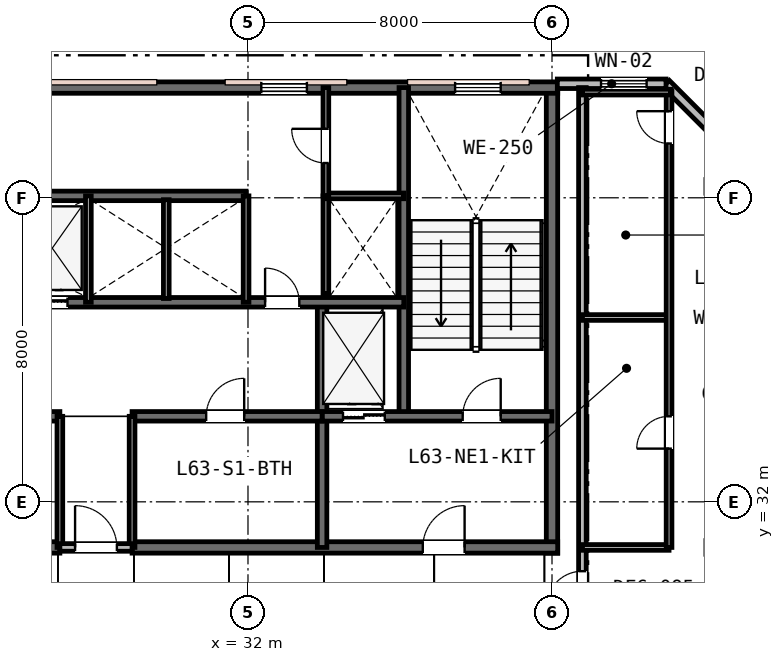
"""IFC4 building model, lengths in metres.
Left out: names, types, materials, properties, quantities, classifications, styles, units other than length and angle.
Written with IfcOpenShell. Run it as: python <this file> out.ifc"""

import sys

from ifc_helpers import new_model, si_unit, direction, frame, frame_2d, origin, place, context, subcontext, project, spatial, rectangle, extrude, element, fill, save


model = new_model("IFC4")
c1 = context("Model", 3, precision=1e-05, world=origin(), true_north=direction((0.0, 1.0)))
c2 = subcontext(c1, "Body", "Model", "MODEL_VIEW")
j1 = project(units=[si_unit("LENGTHUNIT", "METRE"), si_unit("PLANEANGLEUNIT", "RADIAN")], contexts=[c1])
p1 = place(None, origin())
s1 = spatial("IfcSite", under=j1, at=p1, CompositionType="ELEMENT")
p2 = place(p1, origin())
s2 = spatial("IfcBuilding", under=s1, at=p2, CompositionType="ELEMENT")
p3 = place(p2, frame((0.0, 0.0, 245.0)))
s3 = spatial("IfcBuildingStorey", under=s2, at=p3, CompositionType="ELEMENT", Elevation=245.0)
p4 = place(p3, frame((40.0, 30.65, 0.0), z_axis=(0.0, 0.0, 1.0), x_axis=(0.0, 1.0, 0.0)))
e1 = element("IfcWall", 1, at=p4, inside=s3, PredefinedType="SHEAR", context=c2, shape_type="SweptSolid", body=[
    extrude(rectangle(XDim=12.3, YDim=0.3, at=frame_2d((6.15, 0.0))), origin(), (0.0, 0.0, 1.0), 3.8),
])
p5 = place(p3, frame((15.85, 42.9, 0.0), z_axis=(0.0, 0.0, 1.0), x_axis=(1.0, 0.0, 0.0)))
e2 = element("IfcWall", 2, at=p5, inside=s3, PredefinedType="SHEAR", context=c2, shape_type="SweptSolid", body=[
    extrude(rectangle(XDim=24.3, YDim=0.3, at=frame_2d((12.15, 0.0))), origin(), (0.0, 0.0, 1.0), 3.8),
])
p6 = place(p5, frame((1.6, 0.0, 0.95)))
e3 = element("IfcOpeningElement", 3, at=p6, cuts=e2, PredefinedType="OPENING", context=c2, shape_type="SweptSolid", body=[
    extrude(rectangle(XDim=1.2, YDim=1.6, at=frame_2d((0.6, 0.8))), frame((0.0, 0.16, 0.0), z_axis=(0.0, -1.0, 0.0), x_axis=(1.0, 0.0, 0.0)), (0.0, 0.0, 1.0), 0.32),
])
p7 = place(p5, frame((16.5, 0.0, 0.95)))
e4 = element("IfcOpeningElement", 4, at=p7, cuts=e2, PredefinedType="OPENING", context=c2, shape_type="SweptSolid", body=[
    extrude(rectangle(XDim=1.2, YDim=1.6, at=frame_2d((0.6, 0.8))), frame((0.0, 0.16, 0.0), z_axis=(0.0, -1.0, 0.0), x_axis=(1.0, 0.0, 0.0)), (0.0, 0.0, 1.0), 0.32),
])
p8 = place(p5, frame((21.6, 0.0, 0.95)))
e5 = element("IfcOpeningElement", 5, at=p8, cuts=e2, PredefinedType="OPENING", context=c2, shape_type="SweptSolid", body=[
    extrude(rectangle(XDim=1.2, YDim=1.6, at=frame_2d((0.6, 0.8))), frame((0.0, 0.16, 0.0), z_axis=(0.0, -1.0, 0.0), x_axis=(1.0, 0.0, 0.0)), (0.0, 0.0, 1.0), 0.32),
])
p9 = place(p3, frame((15.85, 30.8, 0.0), z_axis=(0.0, 0.0, 1.0), x_axis=(1.0, 0.0, 0.0)))
e6 = element("IfcWall", 6, at=p9, inside=s3, PredefinedType="SHEAR", context=c2, shape_type="SweptSolid", body=[
    extrude(rectangle(XDim=11.2, YDim=0.3, at=frame_2d((5.6, 0.0))), origin(), (0.0, 0.0, 1.0), 3.8),
])
p10 = place(p9, frame((2.45, 0.0, 0.0)))
e7 = element("IfcOpeningElement", 7, at=p10, cuts=e6, PredefinedType="OPENING", context=c2, shape_type="SweptSolid", body=[
    extrude(rectangle(XDim=1.1, YDim=2.15, at=frame_2d((0.55, 1.075))), frame((0.0, 0.16, 0.0), z_axis=(0.0, -1.0, 0.0), x_axis=(1.0, 0.0, 0.0)), (0.0, 0.0, 1.0), 0.32),
])
p11 = place(p3, frame((28.95, 30.8, 0.0), z_axis=(0.0, 0.0, 1.0), x_axis=(1.0, 0.0, 0.0)))
e8 = element("IfcWall", 8, at=p11, inside=s3, PredefinedType="SHEAR", context=c2, shape_type="SweptSolid", body=[
    extrude(rectangle(XDim=11.2, YDim=0.3, at=frame_2d((5.6, 0.0))), origin(), (0.0, 0.0, 1.0), 3.8),
])
p12 = place(p11, frame((7.65, 0.0, 0.0)))
e9 = element("IfcOpeningElement", 9, at=p12, cuts=e8, PredefinedType="OPENING", context=c2, shape_type="SweptSolid", body=[
    extrude(rectangle(XDim=1.1, YDim=2.15, at=frame_2d((0.55, 1.075))), frame((0.0, 0.16, 0.0), z_axis=(0.0, -1.0, 0.0), x_axis=(1.0, 0.0, 0.0)), (0.0, 0.0, 1.0), 0.32),
])
p13 = place(p3, frame((36.1, 34.25, 0.0), z_axis=(0.0, 0.0, 1.0), x_axis=(0.0, 1.0, 0.0)))
e10 = element("IfcWall", 10, at=p13, inside=s3, PredefinedType="SHEAR", context=c2, shape_type="SweptSolid", body=[
    extrude(rectangle(XDim=8.65, YDim=0.25, at=frame_2d((4.325, 0.0))), origin(), (0.0, 0.0, 1.0), 3.8),
])
p14 = place(p3, frame((33.95, 30.8, 0.0), z_axis=(0.0, 0.0, 1.0), x_axis=(0.0, 1.0, 0.0)))
e11 = element("IfcWall", 11, at=p14, inside=s3, PredefinedType="SHEAR", context=c2, shape_type="SweptSolid", body=[
    extrude(rectangle(XDim=6.45, YDim=0.25, at=frame_2d((3.225, 0.0))), origin(), (0.0, 0.0, 1.0), 3.8),
])
p15 = place(p3, frame((33.95, 34.25, 0.0), z_axis=(0.0, 0.0, 1.0), x_axis=(1.0, 0.0, 0.0)))
e12 = element("IfcWall", 12, at=p15, inside=s3, PredefinedType="SHEAR", context=c2, shape_type="SweptSolid", body=[
    extrude(rectangle(XDim=6.05, YDim=0.25, at=frame_2d((3.025, 0.0))), origin(), (0.0, 0.0, 1.0), 3.8),
])
p16 = place(p15, frame((3.7, 0.0, 0.0)))
e13 = element("IfcOpeningElement", 13, at=p16, cuts=e12, PredefinedType="OPENING", context=c2, shape_type="SweptSolid", body=[
    extrude(rectangle(XDim=1.0, YDim=2.15, at=frame_2d((0.5, 1.075))), frame((0.0, 0.135, 0.0), z_axis=(0.0, -1.0, 0.0), x_axis=(1.0, 0.0, 0.0)), (0.0, 0.0, 1.0), 0.27),
])
p17 = place(p15, frame((0.55, 0.0, 0.0)))
e14 = element("IfcOpeningElement", 14, at=p17, cuts=e12, PredefinedType="OPENING", context=c2, shape_type="SweptSolid", body=[
    extrude(rectangle(XDim=1.1, YDim=2.15, at=frame_2d((0.55, 1.075))), frame((0.0, 0.135, 0.0), z_axis=(0.0, -1.0, 0.0), x_axis=(1.0, 0.0, 0.0)), (0.0, 0.0, 1.0), 0.27),
])
p18 = place(p3, frame((22.05, 34.25, 0.0), z_axis=(0.0, 0.0, 1.0), x_axis=(1.0, 0.0, 0.0)))
e15 = element("IfcWall", 15, at=p18, inside=s3, PredefinedType="SHEAR", context=c2, shape_type="SweptSolid", body=[
    extrude(rectangle(XDim=5.0, YDim=0.25, at=frame_2d((2.5, 0.0))), origin(), (0.0, 0.0, 1.0), 3.8),
])
p19 = place(p18, frame((1.95, 0.0, 0.0)))
e16 = element("IfcOpeningElement", 16, at=p19, cuts=e15, PredefinedType="OPENING", context=c2, shape_type="SweptSolid", body=[
    extrude(rectangle(XDim=1.0, YDim=2.15, at=frame_2d((0.5, 1.075))), frame((0.0, 0.135, 0.0), z_axis=(0.0, -1.0, 0.0), x_axis=(1.0, 0.0, 0.0)), (0.0, 0.0, 1.0), 0.27),
])
p20 = place(p3, frame((28.95, 34.25, 0.0), z_axis=(0.0, 0.0, 1.0), x_axis=(1.0, 0.0, 0.0)))
e17 = element("IfcWall", 17, at=p20, inside=s3, PredefinedType="SHEAR", context=c2, shape_type="SweptSolid", body=[
    extrude(rectangle(XDim=5.0, YDim=0.25, at=frame_2d((2.5, 0.0))), origin(), (0.0, 0.0, 1.0), 3.8),
])
p21 = place(p20, frame((1.95, 0.0, 0.0)))
e18 = element("IfcOpeningElement", 18, at=p21, cuts=e17, PredefinedType="OPENING", context=c2, shape_type="SweptSolid", body=[
    extrude(rectangle(XDim=1.0, YDim=2.15, at=frame_2d((0.5, 1.075))), frame((0.0, 0.135, 0.0), z_axis=(0.0, -1.0, 0.0), x_axis=(1.0, 0.0, 0.0)), (0.0, 0.0, 1.0), 0.27),
])
p22 = place(p3, frame((19.9, 37.25, 0.0), z_axis=(0.0, 0.0, 1.0), x_axis=(1.0, 0.0, 0.0)))
e19 = element("IfcWall", 19, at=p22, inside=s3, PredefinedType="SHEAR", context=c2, shape_type="SweptSolid", body=[
    extrude(rectangle(XDim=16.2, YDim=0.25, at=frame_2d((8.1, 0.0))), origin(), (0.0, 0.0, 1.0), 3.8),
])
p23 = place(p22, frame((12.55, 0.0, 0.0)))
e20 = element("IfcOpeningElement", 20, at=p23, cuts=e19, PredefinedType="OPENING", context=c2, shape_type="SweptSolid", body=[
    extrude(rectangle(XDim=0.9, YDim=2.15, at=frame_2d((0.45, 1.075))), frame((0.0, 0.135, 0.0), z_axis=(0.0, -1.0, 0.0), x_axis=(1.0, 0.0, 0.0)), (0.0, 0.0, 1.0), 0.27),
])
p24 = place(p22, frame((2.5, 0.0, 0.0)))
e21 = element("IfcOpeningElement", 21, at=p24, cuts=e19, PredefinedType="OPENING", context=c2, shape_type="SweptSolid", body=[
    extrude(rectangle(XDim=1.05, YDim=2.15, at=frame_2d((0.525, 1.075))), frame((0.0, 0.135, 0.0), z_axis=(0.0, -1.0, 0.0), x_axis=(1.0, 0.0, 0.0)), (0.0, 0.0, 1.0), 0.27),
])
p25 = place(p22, frame((4.4, 0.0, 0.0)))
e22 = element("IfcOpeningElement", 22, at=p25, cuts=e19, PredefinedType="OPENING", context=c2, shape_type="SweptSolid", body=[
    extrude(rectangle(XDim=1.05, YDim=2.15, at=frame_2d((0.525, 1.075))), frame((0.0, 0.135, 0.0), z_axis=(0.0, -1.0, 0.0), x_axis=(1.0, 0.0, 0.0)), (0.0, 0.0, 1.0), 0.27),
])
p26 = place(p22, frame((6.3, 0.0, 0.0)))
e23 = element("IfcOpeningElement", 23, at=p26, cuts=e19, PredefinedType="OPENING", context=c2, shape_type="SweptSolid", body=[
    extrude(rectangle(XDim=1.05, YDim=2.15, at=frame_2d((0.525, 1.075))), frame((0.0, 0.135, 0.0), z_axis=(0.0, -1.0, 0.0), x_axis=(1.0, 0.0, 0.0)), (0.0, 0.0, 1.0), 0.27),
])
p27 = place(p3, frame((19.9, 40.05, 0.0), z_axis=(0.0, 0.0, 1.0), x_axis=(1.0, 0.0, 0.0)))
e24 = element("IfcWall", 24, at=p27, inside=s3, PredefinedType="SHEAR", context=c2, shape_type="SweptSolid", body=[
    extrude(rectangle(XDim=12.05, YDim=0.25, at=frame_2d((6.025, 0.0))), origin(), (0.0, 0.0, 1.0), 3.8),
])
p28 = place(p3, frame((46.0, 40.0, 0.0), z_axis=(0.0, 0.0, 1.0), x_axis=(-0.707106781187, 0.707106781187, 0.0)))
e25 = element("IfcWall", 25, at=p28, inside=s3, PredefinedType="STANDARD", context=c2, shape_type="SweptSolid", body=[
    extrude(rectangle(XDim=4.243, YDim=0.25, at=frame_2d((2.121, 0.0))), origin(), (0.0, 0.0, 1.0), 3.53),
])
p29 = place(p28, frame((1.411, 0.0, 0.85)))
e26 = element("IfcOpeningElement", 26, at=p29, cuts=e25, PredefinedType="OPENING", context=c2, shape_type="SweptSolid", body=[
    extrude(rectangle(XDim=1.2, YDim=1.6, at=frame_2d((0.6, 0.8))), frame((0.0, 0.135, 0.0), z_axis=(0.0, -1.0, 0.0), x_axis=(1.0, 0.0, 0.0)), (0.0, 0.0, 1.0), 0.27),
])
p30 = place(p3, frame((43.0, 43.0, 0.0), z_axis=(0.0, 0.0, 1.0), x_axis=(-1.0, 0.0, 0.0)))
e27 = element("IfcWall", 27, at=p30, inside=s3, PredefinedType="STANDARD", context=c2, shape_type="SweptSolid", body=[
    extrude(rectangle(XDim=2.86, YDim=0.25, at=frame_2d((1.43, 0.0))), origin(), (0.0, 0.0, 1.0), 3.53),
])
p31 = place(p30, frame((0.51, 0.0, 0.85)))
e28 = element("IfcOpeningElement", 28, at=p31, cuts=e27, PredefinedType="OPENING", context=c2, shape_type="SweptSolid", body=[
    extrude(rectangle(XDim=1.2, YDim=1.6, at=frame_2d((0.6, 0.8))), frame((0.0, 0.135, 0.0), z_axis=(0.0, -1.0, 0.0), x_axis=(1.0, 0.0, 0.0)), (0.0, 0.0, 1.0), 0.27),
])
for number, where, z_axis, x_axis in (
    (29, (27.05, 30.8, 0.0), (0.0, 0.0, 1.0), (0.0, 1.0, 0.0)),
    (30, (28.95, 30.8, 0.0), (0.0, 0.0, 1.0), (0.0, 1.0, 0.0)),
):
    element("IfcWall", number, at=place(p3, frame(where, z_axis=z_axis, x_axis=x_axis)), inside=s3, PredefinedType="PLUMBINGWALL", context=c2, shape_type="SweptSolid", body=[
        extrude(rectangle(XDim=3.45, YDim=0.15, at=frame_2d((1.725, 0.0))), origin(), (0.0, 0.0, 1.0), 3.28),
    ])
p32 = place(p3, frame((27.05, 30.8, 0.0), z_axis=(0.0, 0.0, 1.0), x_axis=(1.0, 0.0, 0.0)))
e31 = element("IfcWall", 31, at=p32, inside=s3, PredefinedType="PARTITIONING", context=c2, shape_type="SweptSolid", body=[
    extrude(rectangle(XDim=1.9, YDim=0.2, at=frame_2d((0.95, 0.0))), origin(), (0.0, 0.0, 1.0), 3.28),
])
p33 = place(p32, frame((0.4, 0.0, 0.0)))
e32 = element("IfcOpeningElement", 32, at=p33, cuts=e31, PredefinedType="OPENING", context=c2, shape_type="SweptSolid", body=[
    extrude(rectangle(XDim=1.1, YDim=2.15, at=frame_2d((0.55, 1.075))), frame((0.0, 0.11, 0.0), z_axis=(0.0, -1.0, 0.0), x_axis=(1.0, 0.0, 0.0)), (0.0, 0.0, 1.0), 0.22),
])
for number, where, z_axis, x_axis in (
    (33, (27.8, 37.25, 0.0), (0.0, 0.0, 1.0), (0.0, 1.0, 0.0)),
    (34, (31.95, 37.25, 0.0), (0.0, 0.0, 1.0), (0.0, 1.0, 0.0)),
):
    element("IfcWall", number, at=place(p3, frame(where, z_axis=z_axis, x_axis=x_axis)), inside=s3, PredefinedType="PLUMBINGWALL", context=c2, shape_type="SweptSolid", body=[
        extrude(rectangle(XDim=2.8, YDim=0.15, at=frame_2d((1.4, 0.0))), origin(), (0.0, 0.0, 1.0), 3.53),
    ])
p34 = place(p3, frame((29.85, 37.35, 0.0), z_axis=(0.0, 0.0, 1.0), x_axis=(0.0, 1.0, 0.0)))
e35 = element("IfcWall", 35, at=p34, inside=s3, PredefinedType="PLUMBINGWALL", context=c2, shape_type="SweptSolid", body=[
    extrude(rectangle(XDim=2.6, YDim=0.15, at=frame_2d((1.3, 0.0))), origin(), (0.0, 0.0, 1.0), 3.53),
])
p35 = place(p3, frame((34.05, 37.473, 0.0), z_axis=(0.0, 0.0, 1.0), x_axis=(0.0, 1.0, 0.0)))
e36 = element("IfcWall", 36, at=p35, inside=s3, PredefinedType="PLUMBINGWALL", context=c2, shape_type="SweptSolid", body=[
    extrude(rectangle(XDim=2.577, YDim=0.15, at=frame_2d((1.288, 0.0))), origin(), (0.0, 0.0, 1.0), 3.53),
])
p36 = place(p3, frame((34.05, 40.05, 0.0), z_axis=(0.0, 0.0, 1.0), x_axis=(1.0, 0.0, 0.0)))
e37 = element("IfcWall", 37, at=p36, inside=s3, PredefinedType="PARTITIONING", context=c2, shape_type="SweptSolid", body=[
    extrude(rectangle(XDim=2.05, YDim=0.15, at=frame_2d((1.025, 0.0))), origin(), (0.0, 0.0, 1.0), 3.53),
])
p37 = place(p3, frame((34.05, 40.05, 0.0), z_axis=(0.0, 0.0, 1.0), x_axis=(0.0, 1.0, 0.0)))
e38 = element("IfcWall", 38, at=p37, inside=s3, PredefinedType="PARTITIONING", context=c2, shape_type="SweptSolid", body=[
    extrude(rectangle(XDim=2.85, YDim=0.15, at=frame_2d((1.425, 0.0))), origin(), (0.0, 0.0, 1.0), 3.53),
])
p38 = place(p37, frame((0.865, 0.0, 0.0)))
e39 = element("IfcOpeningElement", 39, at=p38, cuts=e38, PredefinedType="OPENING", context=c2, shape_type="SweptSolid", body=[
    extrude(rectangle(XDim=0.9, YDim=2.15, at=frame_2d((0.45, 1.075))), frame((0.0, 0.085, 0.0), z_axis=(0.0, -1.0, 0.0), x_axis=(1.0, 0.0, 0.0)), (0.0, 0.0, 1.0), 0.17),
])
p39 = place(p3, frame((40.8, 28.6, 0.0), z_axis=(0.0, 0.0, 1.0), x_axis=(0.0, 1.0, 0.0)))
e40 = element("IfcWall", 40, at=p39, inside=s3, PredefinedType="PARTITIONING", context=c2, shape_type="SweptSolid", body=[
    extrude(rectangle(XDim=14.3, YDim=0.2, at=frame_2d((7.15, 0.0))), origin(), (0.0, 0.0, 1.0), 3.16),
])
p40 = place(p39, frame((0.625, 0.0, 0.0)))
e41 = element("IfcOpeningElement", 41, at=p40, cuts=e40, PredefinedType="OPENING", context=c2, shape_type="SweptSolid", body=[
    extrude(rectangle(XDim=0.95, YDim=2.15, at=frame_2d((0.475, 1.075))), frame((0.0, 0.11, 0.0), z_axis=(0.0, -1.0, 0.0), x_axis=(1.0, 0.0, 0.0)), (0.0, 0.0, 1.0), 0.22),
])
p41 = place(p3, frame((40.8, 30.8, 0.0), z_axis=(0.0, 0.0, 1.0), x_axis=(1.0, 0.0, 0.0)))
e42 = element("IfcWall", 42, at=p41, inside=s3, PredefinedType="PARTITIONING", context=c2, shape_type="SweptSolid", body=[
    extrude(rectangle(XDim=2.28, YDim=0.15, at=frame_2d((1.14, 0.0))), origin(), (0.0, 0.0, 1.0), 3.16),
])
p42 = place(p3, frame((40.8, 36.85, 0.0), z_axis=(0.0, 0.0, 1.0), x_axis=(1.0, 0.0, 0.0)))
e43 = element("IfcWall", 43, at=p42, inside=s3, PredefinedType="PARTITIONING", context=c2, shape_type="SweptSolid", body=[
    extrude(rectangle(XDim=2.28, YDim=0.15, at=frame_2d((1.14, 0.0))), origin(), (0.0, 0.0, 1.0), 3.53),
])
p43 = place(p3, frame((43.08, 30.8, 0.0), z_axis=(0.0, 0.0, 1.0), x_axis=(0.0, 1.0, 0.0)))
e44 = element("IfcWall", 44, at=p43, inside=s3, PredefinedType="PARTITIONING", context=c2, shape_type="SweptSolid", body=[
    extrude(rectangle(XDim=12.02, YDim=0.15, at=frame_2d((6.01, 0.0))), origin(), (0.0, 0.0, 1.0), 3.16),
])
p44 = place(p43, frame((2.6, 0.0, 0.0)))
e45 = element("IfcOpeningElement", 45, at=p44, cuts=e44, PredefinedType="OPENING", context=c2, shape_type="SweptSolid", body=[
    extrude(rectangle(XDim=0.85, YDim=2.15, at=frame_2d((0.425, 1.075))), frame((0.0, 0.085, 0.0), z_axis=(0.0, -1.0, 0.0), x_axis=(1.0, 0.0, 0.0)), (0.0, 0.0, 1.0), 0.17),
])
p45 = place(p43, frame((10.629, 0.0, 0.0)))
e46 = element("IfcOpeningElement", 46, at=p45, cuts=e44, PredefinedType="OPENING", context=c2, shape_type="SweptSolid", body=[
    extrude(rectangle(XDim=0.85, YDim=2.15, at=frame_2d((0.425, 1.075))), frame((0.0, 0.085, 0.0), z_axis=(0.0, -1.0, 0.0), x_axis=(1.0, 0.0, 0.0)), (0.0, 0.0, 1.0), 0.17),
])
p46 = place(p3, frame((40.8, 42.78, 0.0), z_axis=(0.0, 0.0, 1.0), x_axis=(1.0, 0.0, 0.0)))
e47 = element("IfcWall", 47, at=p46, inside=s3, PredefinedType="PARTITIONING", context=c2, shape_type="SweptSolid", body=[
    extrude(rectangle(XDim=2.32, YDim=0.15, at=frame_2d((1.16, 0.0))), origin(), (0.0, 0.0, 1.0), 3.53),
])
p47 = place(p7, origin())
e48 = element("IfcWindow", 48, at=p47, inside=s3, PartitioningType="SINGLE_PANEL", PredefinedType="WINDOW", context=c2, shape_type="SweptSolid", body=[
    extrude(rectangle(XDim=1.2, YDim=1.6, at=frame_2d((0.6, 0.8))), frame((0.0, 0.03, 0.0), z_axis=(0.0, -1.0, 0.0), x_axis=(1.0, 0.0, 0.0)), (0.0, 0.0, 1.0), 0.06),
])
fill(e4, e48)
p48 = place(p8, origin())
e49 = element("IfcWindow", 49, at=p48, inside=s3, PartitioningType="SINGLE_PANEL", PredefinedType="WINDOW", context=c2, shape_type="SweptSolid", body=[
    extrude(rectangle(XDim=1.2, YDim=1.6, at=frame_2d((0.6, 0.8))), frame((0.0, 0.03, 0.0), z_axis=(0.0, -1.0, 0.0), x_axis=(1.0, 0.0, 0.0)), (0.0, 0.0, 1.0), 0.06),
])
fill(e5, e49)
p49 = place(p31, origin())
e50 = element("IfcWindow", 50, at=p49, inside=s3, PartitioningType="SINGLE_PANEL", PredefinedType="WINDOW", context=c2, shape_type="SweptSolid", body=[
    extrude(rectangle(XDim=1.2, YDim=1.6, at=frame_2d((0.6, 0.8))), frame((0.0, 0.03, 0.0), z_axis=(0.0, -1.0, 0.0), x_axis=(1.0, 0.0, 0.0)), (0.0, 0.0, 1.0), 0.06),
])
fill(e28, e50)
p50 = place(p33, origin())
e51 = element("IfcDoor", 51, at=p50, inside=s3, OperationType="SINGLE_SWING_LEFT", PredefinedType="DOOR", context=c2, shape_type="SweptSolid", body=[
    extrude(rectangle(XDim=1.1, YDim=2.15, at=frame_2d((0.55, 1.075))), frame((0.0, 0.025, 0.0), z_axis=(0.0, -1.0, 0.0), x_axis=(1.0, 0.0, 0.0)), (0.0, 0.0, 1.0), 0.05),
])
fill(e32, e51)
p51 = place(p16, origin())
e52 = element("IfcDoor", 52, at=p51, inside=s3, OperationType="SINGLE_SWING_RIGHT", PredefinedType="DOOR", context=c2, shape_type="SweptSolid", body=[
    extrude(rectangle(XDim=1.0, YDim=2.15, at=frame_2d((0.5, 1.075))), frame((0.0, 0.025, 0.0), z_axis=(0.0, -1.0, 0.0), x_axis=(1.0, 0.0, 0.0)), (0.0, 0.0, 1.0), 0.05),
])
fill(e13, e52)
p52 = place(p12, origin())
e53 = element("IfcDoor", 53, at=p52, inside=s3, OperationType="SINGLE_SWING_RIGHT", PredefinedType="DOOR", context=c2, shape_type="SweptSolid", body=[
    extrude(rectangle(XDim=1.1, YDim=2.15, at=frame_2d((0.55, 1.075))), frame((0.0, 0.025, 0.0), z_axis=(0.0, -1.0, 0.0), x_axis=(1.0, 0.0, 0.0)), (0.0, 0.0, 1.0), 0.05),
])
fill(e9, e53)
p53 = place(p21, origin())
e54 = element("IfcDoor", 54, at=p53, inside=s3, OperationType="SINGLE_SWING_RIGHT", PredefinedType="DOOR", context=c2, shape_type="SweptSolid", body=[
    extrude(rectangle(XDim=1.0, YDim=2.15, at=frame_2d((0.5, 1.075))), frame((0.0, 0.025, 0.0), z_axis=(0.0, -1.0, 0.0), x_axis=(1.0, 0.0, 0.0)), (0.0, 0.0, 1.0), 0.05),
])
fill(e18, e54)
p54 = place(p23, origin())
e55 = element("IfcDoor", 55, at=p54, inside=s3, OperationType="SINGLE_SWING_LEFT", PredefinedType="DOOR", context=c2, shape_type="SweptSolid", body=[
    extrude(rectangle(XDim=0.9, YDim=2.15, at=frame_2d((0.45, 1.075))), frame((0.0, 0.025, 0.0), z_axis=(0.0, -1.0, 0.0), x_axis=(1.0, 0.0, 0.0)), (0.0, 0.0, 1.0), 0.05),
])
fill(e20, e55)
p55 = place(p38, origin())
e56 = element("IfcDoor", 56, at=p55, inside=s3, OperationType="SINGLE_SWING_RIGHT", PredefinedType="DOOR", context=c2, shape_type="SweptSolid", body=[
    extrude(rectangle(XDim=0.9, YDim=2.15, at=frame_2d((0.45, 1.075))), frame((0.0, 0.025, 0.0), z_axis=(0.0, -1.0, 0.0), x_axis=(1.0, 0.0, 0.0)), (0.0, 0.0, 1.0), 0.05),
])
fill(e39, e56)
p56 = place(p40, origin())
e57 = element("IfcDoor", 57, at=p56, inside=s3, OperationType="SINGLE_SWING_LEFT", PredefinedType="DOOR", context=c2, shape_type="SweptSolid", body=[
    extrude(rectangle(XDim=0.95, YDim=2.15, at=frame_2d((0.475, 1.075))), frame((0.0, 0.025, 0.0), z_axis=(0.0, -1.0, 0.0), x_axis=(1.0, 0.0, 0.0)), (0.0, 0.0, 1.0), 0.05),
])
fill(e41, e57)
p57 = place(p44, origin())
e58 = element("IfcDoor", 58, at=p57, inside=s3, OperationType="SINGLE_SWING_LEFT", PredefinedType="DOOR", context=c2, shape_type="SweptSolid", body=[
    extrude(rectangle(XDim=0.85, YDim=2.15, at=frame_2d((0.425, 1.075))), frame((0.0, 0.025, 0.0), z_axis=(0.0, -1.0, 0.0), x_axis=(1.0, 0.0, 0.0)), (0.0, 0.0, 1.0), 0.05),
])
fill(e45, e58)
p58 = place(p45, origin())
e59 = element("IfcDoor", 59, at=p58, inside=s3, OperationType="SINGLE_SWING_RIGHT", PredefinedType="DOOR", context=c2, shape_type="SweptSolid", body=[
    extrude(rectangle(XDim=0.85, YDim=2.15, at=frame_2d((0.425, 1.075))), frame((0.0, 0.025, 0.0), z_axis=(0.0, -1.0, 0.0), x_axis=(1.0, 0.0, 0.0)), (0.0, 0.0, 1.0), 0.05),
])
fill(e46, e59)
p59 = place(p17, origin())
e60 = element("IfcDoor", 60, at=p59, inside=s3, OperationType="DOUBLE_DOOR_SLIDING", PredefinedType="DOOR", context=c2, shape_type="SweptSolid", body=[
    extrude(rectangle(XDim=1.1, YDim=2.15, at=frame_2d((0.55, 1.075))), frame((0.0, 0.025, 0.0), z_axis=(0.0, -1.0, 0.0), x_axis=(1.0, 0.0, 0.0)), (0.0, 0.0, 1.0), 0.05),
])
fill(e14, e60)
p60 = place(p26, origin())
e61 = element("IfcDoor", 61, at=p60, inside=s3, OperationType="DOUBLE_DOOR_SLIDING", PredefinedType="DOOR", context=c2, shape_type="SweptSolid", body=[
    extrude(rectangle(XDim=1.05, YDim=2.15, at=frame_2d((0.525, 1.075))), frame((0.0, 0.025, 0.0), z_axis=(0.0, -1.0, 0.0), x_axis=(1.0, 0.0, 0.0)), (0.0, 0.0, 1.0), 0.05),
])
fill(e23, e61)
save(model, sys.argv[1])
